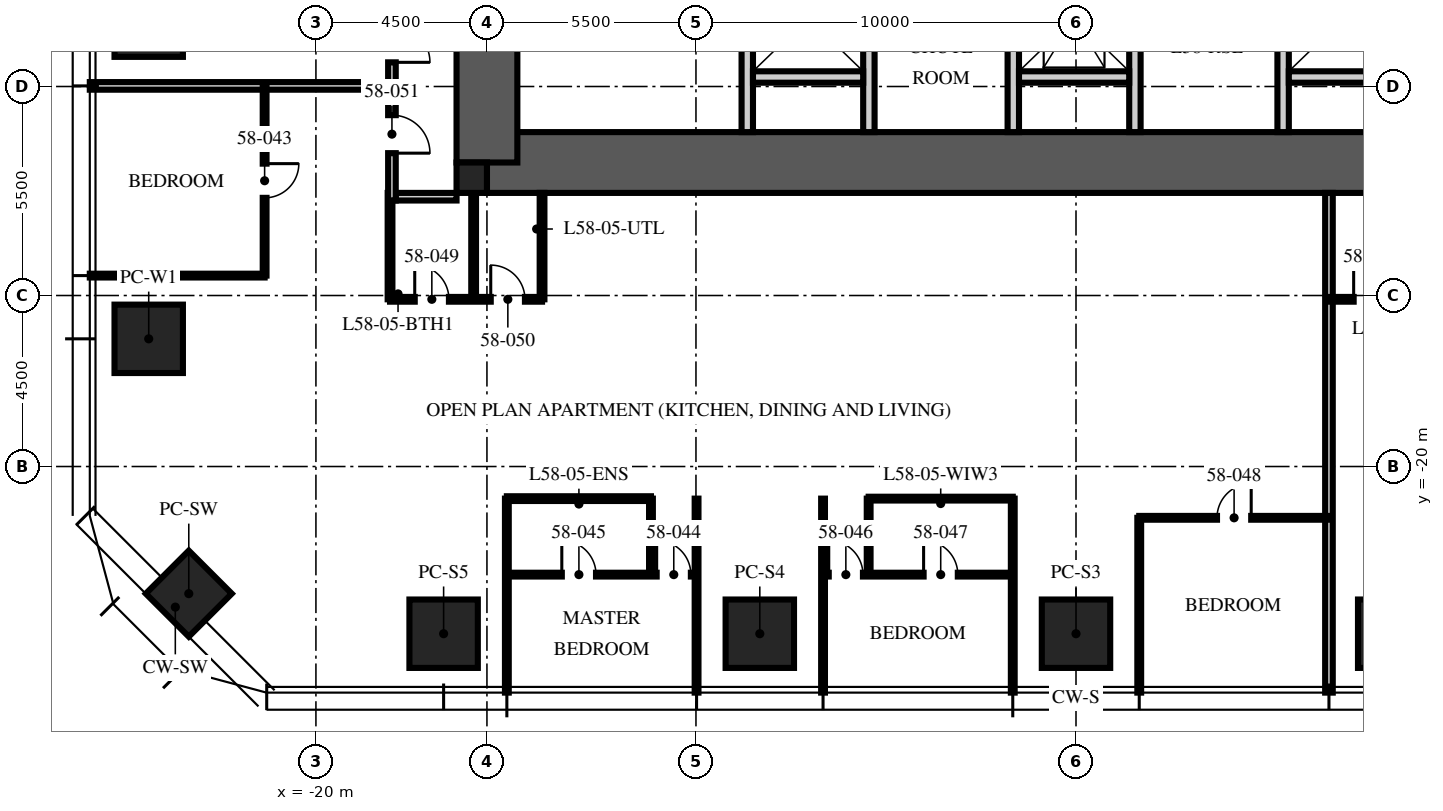
"""IFC4 building model, lengths in metres.
Left out: names, types, materials, properties, quantities, classifications, styles, units other than length and angle.
Written with IfcOpenShell. Run it as: python <this file> out.ifc"""

import sys

from ifc_helpers import new_model, si_unit, direction, frame, frame_2d, origin, origin_2d, place, context, subcontext, project, spatial, rectangle, extrude, element, fill, save


model = new_model("IFC4")
c1 = context("Model", 3, precision=1e-05, world=origin(), true_north=direction((0.0, 1.0)))
c2 = subcontext(c1, "Body", "Model", "MODEL_VIEW")
j1 = project(units=[si_unit("LENGTHUNIT", "METRE"), si_unit("PLANEANGLEUNIT", "RADIAN")], contexts=[c1])
p1 = place(None, origin())
s1 = spatial("IfcSite", under=j1, at=p1, CompositionType="ELEMENT")
p2 = place(p1, origin())
s2 = spatial("IfcBuilding", under=s1, at=p2, CompositionType="ELEMENT")
p3 = place(p2, frame((0.0, 0.0, 233.25)))
s3 = spatial("IfcBuildingStorey", under=s2, at=p3, CompositionType="ELEMENT", Elevation=233.25)
p4 = place(p3, frame((-15.5, -12.0, -0.25), z_axis=(0.0, 0.0, 1.0), x_axis=(1.0, 0.0, 0.0)))
e1 = element("IfcWall", 1, at=p4, inside=s3, PredefinedType="SHEAR", context=c2, shape_type="SweptSolid", body=[
    extrude(rectangle(XDim=31.0, YDim=1.6, at=frame_2d((15.5, 0.0))), origin(), (0.0, 0.0, 1.0), 3.75),
])
p5 = place(p3, frame((-15.5, -12.0, -0.25), z_axis=(0.0, 0.0, 1.0), x_axis=(0.0, 1.0, 0.0)))
e2 = element("IfcWall", 2, at=p5, inside=s3, PredefinedType="SHEAR", context=c2, shape_type="SweptSolid", body=[
    extrude(rectangle(XDim=24.0, YDim=1.6, at=frame_2d((12.0, 0.0))), origin(), (0.0, 0.0, 1.0), 3.75),
])
p6 = place(p5, frame((3.2, 0.0, 0.25)))
e3 = element("IfcOpeningElement", 3, at=p6, cuts=e2, PredefinedType="OPENING", context=c2, shape_type="SweptSolid", body=[
    extrude(rectangle(XDim=1.2, YDim=2.1, at=frame_2d((0.6, 1.05))), frame((0.0, 0.81, 0.0), z_axis=(0.0, -1.0, 0.0), x_axis=(1.0, 0.0, 0.0)), (0.0, 0.0, 1.0), 1.62),
])
p7 = place(p5, frame((19.3, 0.0, 0.25)))
e4 = element("IfcOpeningElement", 4, at=p7, cuts=e2, PredefinedType="OPENING", context=c2, shape_type="SweptSolid", body=[
    extrude(rectangle(XDim=1.8, YDim=2.1, at=frame_2d((0.9, 1.05))), frame((0.0, 0.81, 0.0), z_axis=(0.0, -1.0, 0.0), x_axis=(1.0, 0.0, 0.0)), (0.0, 0.0, 1.0), 1.62),
])
p8 = place(p3, frame((-15.9, -12.4, -0.25), z_axis=(0.0, 0.0, 1.0), x_axis=(1.0, 0.0, 0.0)))
e5 = element("IfcColumn", 5, at=p8, inside=s3, PredefinedType="COLUMN", context=c2, shape_type="SweptSolid", body=[
    extrude(rectangle(XDim=0.8, YDim=0.8, at=origin_2d()), origin(), (0.0, 0.0, 1.0), 3.75),
])
for number, where, z_axis, x_axis in (
    (6, (8.32, -24.4, 0.0), (0.0, 0.0, 1.0), (1.0, 0.0, 0.0)),
    (7, (0.0, -24.4, 0.0), (0.0, 0.0, 1.0), (1.0, 0.0, 0.0)),
    (8, (-8.32, -24.4, 0.0), (0.0, 0.0, 1.0), (1.0, 0.0, 0.0)),
    (9, (-16.64, -24.4, 0.0), (0.0, 0.0, 1.0), (1.0, 0.0, 0.0)),
    (10, (-24.4, -16.64, 0.0), (0.0, 0.0, 1.0), (0.0, 1.0, 0.0)),
    (11, (-24.4, -8.32, 0.0), (0.0, 0.0, 1.0), (0.0, 1.0, 0.0)),
):
    element("IfcColumn", number, at=place(p3, frame(where, z_axis=z_axis, x_axis=x_axis)), inside=s3, PredefinedType="COLUMN", context=c2, shape_type="SweptSolid", body=[
        extrude(rectangle(XDim=1.8, YDim=1.8, at=origin_2d()), origin(), (0.0, 0.0, 1.0), 3.75),
    ])
p9 = place(p3, frame((-23.346, -23.346, 0.0), z_axis=(0.0, 0.0, 1.0), x_axis=(0.707106781187, -0.707106781187, 0.0)))
e12 = element("IfcColumn", 12, at=p9, inside=s3, PredefinedType="COLUMN", context=c2, shape_type="SweptSolid", body=[
    extrude(rectangle(XDim=1.6, YDim=1.6, at=origin_2d()), origin(), (0.0, 0.0, 1.0), 3.75),
])
p10 = place(p3, frame((-8.65, -11.2, 0.0), z_axis=(0.0, 0.0, 1.0), x_axis=(0.0, 1.0, 0.0)))
e13 = element("IfcWall", 13, at=p10, inside=s3, PredefinedType="PARTITIONING", context=c2, shape_type="SweptSolid", body=[
    extrude(rectangle(XDim=6.3, YDim=0.3, at=frame_2d((3.15, 0.0))), origin(), (0.0, 0.0, 1.0), 3.5),
])
p11 = place(p10, frame((2.45, 0.0, 0.0)))
e14 = element("IfcOpeningElement", 14, at=p11, cuts=e13, PredefinedType="OPENING", context=c2, shape_type="SweptSolid", body=[
    extrude(rectangle(XDim=1.1, YDim=2.1, at=frame_2d((0.55, 1.05))), frame((0.0, 0.16, 0.0), z_axis=(0.0, -1.0, 0.0), x_axis=(1.0, 0.0, 0.0)), (0.0, 0.0, 1.0), 0.32),
])
for number, where, z_axis, x_axis in (
    (15, (-5.45, -11.2, 0.0), (0.0, 0.0, 1.0), (0.0, 1.0, 0.0)),
    (16, (-1.65, -11.2, 0.0), (0.0, 0.0, 1.0), (0.0, 1.0, 0.0)),
    (17, (1.55, -11.2, 0.0), (0.0, 0.0, 1.0), (0.0, 1.0, 0.0)),
    (18, (5.45, -11.2, 0.0), (0.0, 0.0, 1.0), (0.0, 1.0, 0.0)),
):
    element("IfcWall", number, at=place(p3, frame(where, z_axis=z_axis, x_axis=x_axis)), inside=s3, PredefinedType="PARTITIONING", context=c2, shape_type="SweptSolid", body=[
        extrude(rectangle(XDim=4.4, YDim=0.3, at=frame_2d((2.2, 0.0))), origin(), (0.0, 0.0, 1.0), 3.5),
    ])
for number, where, z_axis, x_axis in (
    (19, (-8.5, -9.75, 0.0), (0.0, 0.0, 1.0), (1.0, 0.0, 0.0)),
    (20, (-1.5, -9.75, 0.0), (0.0, 0.0, 1.0), (1.0, 0.0, 0.0)),
    (21, (5.6, -9.75, 0.0), (0.0, 0.0, 1.0), (1.0, 0.0, 0.0)),
):
    element("IfcWall", number, at=place(p3, frame(where, z_axis=z_axis, x_axis=x_axis)), inside=s3, PredefinedType="PARTITIONING", context=c2, shape_type="SweptSolid", body=[
        extrude(rectangle(XDim=2.9, YDim=0.3, at=frame_2d((1.45, 0.0))), origin(), (0.0, 0.0, 1.0), 3.5),
    ])
p12 = place(p3, frame((-16.3, -12.9, 0.0), z_axis=(0.0, 0.0, 1.0), x_axis=(-1.0, 0.0, 0.0)))
e22 = element("IfcWall", 22, at=p12, inside=s3, PredefinedType="PARTITIONING", context=c2, shape_type="SweptSolid", body=[
    extrude(rectangle(XDim=1.6, YDim=0.2, at=frame_2d((0.8, 0.0))), origin(), (0.0, 0.0, 1.0), 2.3),
])
p13 = place(p3, frame((-18.1, -9.984, 0.0), z_axis=(0.0, 0.0, 1.0), x_axis=(-1.0, 0.0, 0.0)))
e23 = element("IfcWall", 23, at=p13, inside=s3, PredefinedType="PARTITIONING", context=c2, shape_type="SweptSolid", body=[
    extrude(rectangle(XDim=7.85, YDim=0.2, at=frame_2d((3.925, 0.0))), origin(), (0.0, 0.0, 1.0), 2.91),
])
p14 = place(p3, frame((-21.35, -14.976, 0.0), z_axis=(0.0, 0.0, 1.0), x_axis=(-1.0, 0.0, 0.0)))
e24 = element("IfcWall", 24, at=p14, inside=s3, PredefinedType="PARTITIONING", context=c2, shape_type="SweptSolid", body=[
    extrude(rectangle(XDim=4.6, YDim=0.1, at=frame_2d((2.3, 0.0))), origin(), (0.0, 0.0, 1.0), 2.91),
])
for number, where, z_axis, x_axis in (
    (25, (-14.976, -20.845, 0.0), (0.0, 0.0, 1.0), (0.0, -1.0, 0.0)),
    (26, (-9.984, -20.845, 0.0), (0.0, 0.0, 1.0), (0.0, -1.0, 0.0)),
    (27, (-6.656, -20.845, 0.0), (0.0, 0.0, 1.0), (0.0, -1.0, 0.0)),
    (28, (-1.664, -20.845, 0.0), (0.0, 0.0, 1.0), (0.0, -1.0, 0.0)),
):
    element("IfcWall", number, at=place(p3, frame(where, z_axis=z_axis, x_axis=x_axis)), inside=s3, PredefinedType="PARTITIONING", context=c2, shape_type="SweptSolid", body=[
        extrude(rectangle(XDim=5.105, YDim=0.1, at=frame_2d((2.552, 0.0))), origin(), (0.0, 0.0, 1.0), 2.91),
    ])
p15 = place(p3, frame((1.664, -21.35, 0.0), z_axis=(0.0, 0.0, 1.0), x_axis=(0.0, -1.0, 0.0)))
e29 = element("IfcWall", 29, at=p15, inside=s3, PredefinedType="PARTITIONING", context=c2, shape_type="SweptSolid", body=[
    extrude(rectangle(XDim=4.6, YDim=0.1, at=frame_2d((2.3, 0.0))), origin(), (0.0, 0.0, 1.0), 2.91),
])
p16 = place(p3, frame((6.656, -12.8, 0.0), z_axis=(0.0, 0.0, 1.0), x_axis=(0.0, -1.0, 0.0)))
e30 = element("IfcWall", 30, at=p16, inside=s3, PredefinedType="PARTITIONING", context=c2, shape_type="SweptSolid", body=[
    extrude(rectangle(XDim=13.15, YDim=0.2, at=frame_2d((6.575, 0.0))), origin(), (0.0, 0.0, 1.0), 2.91),
])
p17 = place(p3, frame((-21.35, -9.984, 0.0), z_axis=(0.0, 0.0, 1.0), x_axis=(0.0, -1.0, 0.0)))
e31 = element("IfcWall", 31, at=p17, inside=s3, PredefinedType="PARTITIONING", context=c2, shape_type="SweptSolid", body=[
    extrude(rectangle(XDim=4.992, YDim=0.1, at=frame_2d((2.496, 0.0))), origin(), (0.0, 0.0, 1.0), 2.81),
])
p18 = place(p17, frame((2.046, 0.0, 0.0)))
e32 = element("IfcOpeningElement", 32, at=p18, cuts=e31, PredefinedType="OPENING", context=c2, shape_type="SweptSolid", body=[
    extrude(rectangle(XDim=0.9, YDim=2.1, at=frame_2d((0.45, 1.05))), frame((0.0, 0.06, 0.0), z_axis=(0.0, -1.0, 0.0), x_axis=(1.0, 0.0, 0.0)), (0.0, 0.0, 1.0), 0.12),
])
p19 = place(p3, frame((-14.976, -22.845, 0.0), z_axis=(0.0, 0.0, 1.0), x_axis=(1.0, 0.0, 0.0)))
e33 = element("IfcWall", 33, at=p19, inside=s3, PredefinedType="PARTITIONING", context=c2, shape_type="SweptSolid", body=[
    extrude(rectangle(XDim=4.992, YDim=0.1, at=frame_2d((2.496, 0.0))), origin(), (0.0, 0.0, 1.0), 2.81),
])
p20 = place(p19, frame((3.942, 0.0, 0.0)))
e34 = element("IfcOpeningElement", 34, at=p20, cuts=e33, PredefinedType="OPENING", context=c2, shape_type="SweptSolid", body=[
    extrude(rectangle(XDim=0.9, YDim=2.1, at=frame_2d((0.45, 1.05))), frame((0.0, 0.06, 0.0), z_axis=(0.0, -1.0, 0.0), x_axis=(1.0, 0.0, 0.0)), (0.0, 0.0, 1.0), 0.12),
])
p21 = place(p19, frame((1.446, 0.0, 0.0)))
e35 = element("IfcOpeningElement", 35, at=p21, cuts=e33, PredefinedType="OPENING", context=c2, shape_type="SweptSolid", body=[
    extrude(rectangle(XDim=0.9, YDim=2.1, at=frame_2d((0.45, 1.05))), frame((0.0, 0.06, 0.0), z_axis=(0.0, -1.0, 0.0), x_axis=(1.0, 0.0, 0.0)), (0.0, 0.0, 1.0), 0.12),
])
p22 = place(p3, frame((-11.184, -20.845, 0.0), z_axis=(0.0, 0.0, 1.0), x_axis=(0.0, -1.0, 0.0)))
e36 = element("IfcWall", 36, at=p22, inside=s3, PredefinedType="PARTITIONING", context=c2, shape_type="SweptSolid", body=[
    extrude(rectangle(XDim=2.0, YDim=0.1, at=frame_2d((1.0, 0.0))), origin(), (0.0, 0.0, 1.0), 3.5),
])
p23 = place(p3, frame((-14.976, -20.845, 0.0), z_axis=(0.0, 0.0, 1.0), x_axis=(1.0, 0.0, 0.0)))
e37 = element("IfcWall", 37, at=p23, inside=s3, PredefinedType="PARTITIONING", context=c2, shape_type="SweptSolid", body=[
    extrude(rectangle(XDim=3.792, YDim=0.125, at=frame_2d((1.896, 0.0))), origin(), (0.0, 0.0, 1.0), 2.81),
])
p24 = place(p3, frame((-6.656, -22.845, 0.0), z_axis=(0.0, 0.0, 1.0), x_axis=(1.0, 0.0, 0.0)))
e38 = element("IfcWall", 38, at=p24, inside=s3, PredefinedType="PARTITIONING", context=c2, shape_type="SweptSolid", body=[
    extrude(rectangle(XDim=4.992, YDim=0.1, at=frame_2d((2.496, 0.0))), origin(), (0.0, 0.0, 1.0), 2.81),
])
p25 = place(p24, frame((0.15, 0.0, 0.0)))
e39 = element("IfcOpeningElement", 39, at=p25, cuts=e38, PredefinedType="OPENING", context=c2, shape_type="SweptSolid", body=[
    extrude(rectangle(XDim=0.9, YDim=2.1, at=frame_2d((0.45, 1.05))), frame((0.0, 0.06, 0.0), z_axis=(0.0, -1.0, 0.0), x_axis=(1.0, 0.0, 0.0)), (0.0, 0.0, 1.0), 0.12),
])
p26 = place(p24, frame((2.646, 0.0, 0.0)))
e40 = element("IfcOpeningElement", 40, at=p26, cuts=e38, PredefinedType="OPENING", context=c2, shape_type="SweptSolid", body=[
    extrude(rectangle(XDim=0.9, YDim=2.1, at=frame_2d((0.45, 1.05))), frame((0.0, 0.06, 0.0), z_axis=(0.0, -1.0, 0.0), x_axis=(1.0, 0.0, 0.0)), (0.0, 0.0, 1.0), 0.12),
])
p27 = place(p3, frame((-5.456, -20.845, 0.0), z_axis=(0.0, 0.0, 1.0), x_axis=(0.0, -1.0, 0.0)))
e41 = element("IfcWall", 41, at=p27, inside=s3, PredefinedType="PARTITIONING", context=c2, shape_type="SweptSolid", body=[
    extrude(rectangle(XDim=2.0, YDim=0.1, at=frame_2d((1.0, 0.0))), origin(), (0.0, 0.0, 1.0), 3.5),
])
p28 = place(p3, frame((-5.456, -20.845, 0.0), z_axis=(0.0, 0.0, 1.0), x_axis=(1.0, 0.0, 0.0)))
e42 = element("IfcWall", 42, at=p28, inside=s3, PredefinedType="PARTITIONING", context=c2, shape_type="SweptSolid", body=[
    extrude(rectangle(XDim=3.792, YDim=0.1, at=frame_2d((1.896, 0.0))), origin(), (0.0, 0.0, 1.0), 2.81),
])
p29 = place(p3, frame((1.664, -21.35, 0.0), z_axis=(0.0, 0.0, 1.0), x_axis=(1.0, 0.0, 0.0)))
e43 = element("IfcWall", 43, at=p29, inside=s3, PredefinedType="PARTITIONING", context=c2, shape_type="SweptSolid", body=[
    extrude(rectangle(XDim=4.992, YDim=0.1, at=frame_2d((2.496, 0.0))), origin(), (0.0, 0.0, 1.0), 2.81),
])
p30 = place(p29, frame((2.046, 0.0, 0.0)))
e44 = element("IfcOpeningElement", 44, at=p30, cuts=e43, PredefinedType="OPENING", context=c2, shape_type="SweptSolid", body=[
    extrude(rectangle(XDim=0.9, YDim=2.1, at=frame_2d((0.45, 1.05))), frame((0.0, 0.06, 0.0), z_axis=(0.0, -1.0, 0.0), x_axis=(1.0, 0.0, 0.0)), (0.0, 0.0, 1.0), 0.12),
])
p31 = place(p3, frame((-18.05, -15.6, 0.0), z_axis=(0.0, 0.0, 1.0), x_axis=(1.0, 0.0, 0.0)))
e45 = element("IfcWall", 45, at=p31, inside=s3, PredefinedType="PARTITIONING", context=c2, shape_type="SweptSolid", body=[
    extrude(rectangle(XDim=4.0, YDim=0.125, at=frame_2d((2.0, 0.0))), origin(), (0.0, 0.0, 1.0), 2.3),
])
p32 = place(p31, frame((0.65, 0.0, 0.0)))
e46 = element("IfcOpeningElement", 46, at=p32, cuts=e45, PredefinedType="OPENING", context=c2, shape_type="SweptSolid", body=[
    extrude(rectangle(XDim=0.9, YDim=2.1, at=frame_2d((0.45, 1.05))), frame((0.0, 0.073, 0.0), z_axis=(0.0, -1.0, 0.0), x_axis=(1.0, 0.0, 0.0)), (0.0, 0.0, 1.0), 0.145),
])
p33 = place(p31, frame((2.65, 0.0, 0.0)))
e47 = element("IfcOpeningElement", 47, at=p33, cuts=e45, PredefinedType="OPENING", context=c2, shape_type="SweptSolid", body=[
    extrude(rectangle(XDim=0.9, YDim=2.1, at=frame_2d((0.45, 1.05))), frame((0.0, 0.073, 0.0), z_axis=(0.0, -1.0, 0.0), x_axis=(1.0, 0.0, 0.0)), (0.0, 0.0, 1.0), 0.145),
])
for number, where, z_axis, x_axis in (
    (48, (-18.05, -12.8, 0.0), (0.0, 0.0, 1.0), (0.0, -1.0, 0.0)),
    (49, (-15.85, -12.8, 0.0), (0.0, 0.0, 1.0), (0.0, -1.0, 0.0)),
):
    element("IfcWall", number, at=place(p3, frame(where, z_axis=z_axis, x_axis=x_axis)), inside=s3, PredefinedType="PARTITIONING", context=c2, shape_type="SweptSolid", body=[
        extrude(rectangle(XDim=2.8, YDim=0.125, at=frame_2d((1.4, 0.0))), origin(), (0.0, 0.0, 1.0), 2.3),
    ])
p34 = place(p3, frame((-14.05, -12.8, 0.0), z_axis=(0.0, 0.0, 1.0), x_axis=(0.0, -1.0, 0.0)))
e50 = element("IfcWall", 50, at=p34, inside=s3, PredefinedType="PARTITIONING", context=c2, shape_type="SweptSolid", body=[
    extrude(rectangle(XDim=2.8, YDim=0.125, at=frame_2d((1.4, 0.0))), origin(), (0.0, 0.0, 1.0), 3.5),
])
p35 = place(p3, frame((6.656, -15.6, 0.0), z_axis=(0.0, 0.0, 1.0), x_axis=(1.0, 0.0, 0.0)))
e51 = element("IfcWall", 51, at=p35, inside=s3, PredefinedType="PARTITIONING", context=c2, shape_type="SweptSolid", body=[
    extrude(rectangle(XDim=2.2, YDim=0.125, at=frame_2d((1.1, 0.0))), origin(), (0.0, 0.0, 1.0), 2.6),
])
p36 = place(p35, frame((0.65, 0.0, 0.0)))
e52 = element("IfcOpeningElement", 52, at=p36, cuts=e51, PredefinedType="OPENING", context=c2, shape_type="SweptSolid", body=[
    extrude(rectangle(XDim=0.9, YDim=2.1, at=frame_2d((0.45, 1.05))), frame((0.0, 0.073, 0.0), z_axis=(0.0, -1.0, 0.0), x_axis=(1.0, 0.0, 0.0)), (0.0, 0.0, 1.0), 0.145),
])
p37 = place(p3, frame((-18.0, 12.8, 0.0), z_axis=(0.0, 0.0, 1.0), x_axis=(0.0, -1.0, 0.0)))
e53 = element("IfcWall", 53, at=p37, inside=s3, PredefinedType="PARTITIONING", context=c2, shape_type="SweptSolid", body=[
    extrude(rectangle(XDim=25.8, YDim=0.2, at=frame_2d((12.9, 0.0))), origin(), (0.0, 0.0, 1.0), 2.6),
])
p38 = place(p37, frame((4.4, 0.0, 0.0)))
e54 = element("IfcOpeningElement", 54, at=p38, cuts=e53, PredefinedType="OPENING", context=c2, shape_type="SweptSolid", body=[
    extrude(rectangle(XDim=1.0, YDim=2.2, at=frame_2d((0.5, 1.1))), frame((0.0, 0.11, 0.0), z_axis=(0.0, -1.0, 0.0), x_axis=(1.0, 0.0, 0.0)), (0.0, 0.0, 1.0), 0.22),
])
p39 = place(p37, frame((21.164, 0.0, 0.0)))
e55 = element("IfcOpeningElement", 55, at=p39, cuts=e53, PredefinedType="OPENING", context=c2, shape_type="SweptSolid", body=[
    extrude(rectangle(XDim=1.0, YDim=2.2, at=frame_2d((0.5, 1.1))), frame((0.0, 0.11, 0.0), z_axis=(0.0, -1.0, 0.0), x_axis=(1.0, 0.0, 0.0)), (0.0, 0.0, 1.0), 0.22),
])
p40 = place(p37, frame((23.554, 0.0, 0.0)))
e56 = element("IfcOpeningElement", 56, at=p40, cuts=e53, PredefinedType="OPENING", context=c2, shape_type="SweptSolid", body=[
    extrude(rectangle(XDim=1.0, YDim=2.2, at=frame_2d((0.5, 1.1))), frame((0.0, 0.11, 0.0), z_axis=(0.0, -1.0, 0.0), x_axis=(1.0, 0.0, 0.0)), (0.0, 0.0, 1.0), 0.22),
])
p41 = place(p39, origin())
e57 = element("IfcDoor", 57, at=p41, inside=s3, OperationType="SINGLE_SWING_RIGHT", PredefinedType="DOOR", context=c2, shape_type="SweptSolid", body=[
    extrude(rectangle(XDim=1.0, YDim=2.2, at=frame_2d((0.5, 1.1))), frame((0.0, 0.025, 0.0), z_axis=(0.0, -1.0, 0.0), x_axis=(1.0, 0.0, 0.0)), (0.0, 0.0, 1.0), 0.05),
])
fill(e55, e57)
p42 = place(p18, origin())
e58 = element("IfcDoor", 58, at=p42, inside=s3, OperationType="SINGLE_SWING_LEFT", PredefinedType="DOOR", context=c2, shape_type="SweptSolid", body=[
    extrude(rectangle(XDim=0.9, YDim=2.1, at=frame_2d((0.45, 1.05))), frame((0.0, 0.025, 0.0), z_axis=(0.0, -1.0, 0.0), x_axis=(1.0, 0.0, 0.0)), (0.0, 0.0, 1.0), 0.05),
])
fill(e32, e58)
p43 = place(p20, origin())
e59 = element("IfcDoor", 59, at=p43, inside=s3, OperationType="SINGLE_SWING_LEFT", PredefinedType="DOOR", context=c2, shape_type="SweptSolid", body=[
    extrude(rectangle(XDim=0.9, YDim=2.1, at=frame_2d((0.45, 1.05))), frame((0.0, 0.025, 0.0), z_axis=(0.0, -1.0, 0.0), x_axis=(1.0, 0.0, 0.0)), (0.0, 0.0, 1.0), 0.05),
])
fill(e34, e59)
p44 = place(p21, origin())
e60 = element("IfcDoor", 60, at=p44, inside=s3, OperationType="SINGLE_SWING_LEFT", PredefinedType="DOOR", context=c2, shape_type="SweptSolid", body=[
    extrude(rectangle(XDim=0.9, YDim=2.1, at=frame_2d((0.45, 1.05))), frame((0.0, 0.025, 0.0), z_axis=(0.0, -1.0, 0.0), x_axis=(1.0, 0.0, 0.0)), (0.0, 0.0, 1.0), 0.05),
])
fill(e35, e60)
p45 = place(p25, origin())
e61 = element("IfcDoor", 61, at=p45, inside=s3, OperationType="SINGLE_SWING_LEFT", PredefinedType="DOOR", context=c2, shape_type="SweptSolid", body=[
    extrude(rectangle(XDim=0.9, YDim=2.1, at=frame_2d((0.45, 1.05))), frame((0.0, 0.025, 0.0), z_axis=(0.0, -1.0, 0.0), x_axis=(1.0, 0.0, 0.0)), (0.0, 0.0, 1.0), 0.05),
])
fill(e39, e61)
p46 = place(p26, origin())
e62 = element("IfcDoor", 62, at=p46, inside=s3, OperationType="SINGLE_SWING_LEFT", PredefinedType="DOOR", context=c2, shape_type="SweptSolid", body=[
    extrude(rectangle(XDim=0.9, YDim=2.1, at=frame_2d((0.45, 1.05))), frame((0.0, 0.025, 0.0), z_axis=(0.0, -1.0, 0.0), x_axis=(1.0, 0.0, 0.0)), (0.0, 0.0, 1.0), 0.05),
])
fill(e40, e62)
p47 = place(p30, origin())
e63 = element("IfcDoor", 63, at=p47, inside=s3, OperationType="SINGLE_SWING_RIGHT", PredefinedType="DOOR", context=c2, shape_type="SweptSolid", body=[
    extrude(rectangle(XDim=0.9, YDim=2.1, at=frame_2d((0.45, 1.05))), frame((0.0, 0.025, 0.0), z_axis=(0.0, -1.0, 0.0), x_axis=(1.0, 0.0, 0.0)), (0.0, 0.0, 1.0), 0.05),
])
fill(e44, e63)
p48 = place(p32, origin())
e64 = element("IfcDoor", 64, at=p48, inside=s3, OperationType="SINGLE_SWING_LEFT", PredefinedType="DOOR", context=c2, shape_type="SweptSolid", body=[
    extrude(rectangle(XDim=0.9, YDim=2.1, at=frame_2d((0.45, 1.05))), frame((0.0, 0.025, 0.0), z_axis=(0.0, -1.0, 0.0), x_axis=(1.0, 0.0, 0.0)), (0.0, 0.0, 1.0), 0.05),
])
fill(e46, e64)
p49 = place(p33, origin())
e65 = element("IfcDoor", 65, at=p49, inside=s3, OperationType="SINGLE_SWING_LEFT", PredefinedType="DOOR", context=c2, shape_type="SweptSolid", body=[
    extrude(rectangle(XDim=0.9, YDim=2.1, at=frame_2d((0.45, 1.05))), frame((0.0, 0.025, 0.0), z_axis=(0.0, -1.0, 0.0), x_axis=(1.0, 0.0, 0.0)), (0.0, 0.0, 1.0), 0.05),
])
fill(e47, e65)
p50 = place(p40, origin())
e66 = element("IfcDoor", 66, at=p50, inside=s3, OperationType="SINGLE_SWING_RIGHT", PredefinedType="DOOR", context=c2, shape_type="SweptSolid", body=[
    extrude(rectangle(XDim=1.0, YDim=2.2, at=frame_2d((0.5, 1.1))), frame((0.0, 0.025, 0.0), z_axis=(0.0, -1.0, 0.0), x_axis=(1.0, 0.0, 0.0)), (0.0, 0.0, 1.0), 0.05),
])
fill(e56, e66)
p51 = place(p36, origin())
e67 = element("IfcDoor", 67, at=p51, inside=s3, OperationType="SINGLE_SWING_LEFT", PredefinedType="DOOR", context=c2, shape_type="SweptSolid", body=[
    extrude(rectangle(XDim=0.9, YDim=2.1, at=frame_2d((0.45, 1.05))), frame((0.0, 0.025, 0.0), z_axis=(0.0, -1.0, 0.0), x_axis=(1.0, 0.0, 0.0)), (0.0, 0.0, 1.0), 0.05),
])
fill(e52, e67)
save(model, sys.argv[1])
